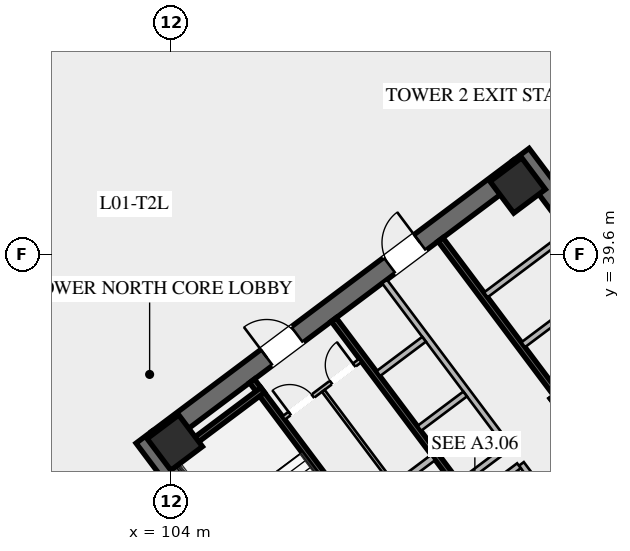
"""IFC4 building model, lengths in metres.
Left out: names, types, materials, properties, quantities, classifications, styles, units other than length and angle.
Written with IfcOpenShell. Run it as: python <this file> out.ifc"""

import sys

from ifc_helpers import new_model, si_unit, direction, frame, frame_2d, origin, origin_2d, place, context, subcontext, project, spatial, rectangle, hollow_rectangle, extrude, element, fill, save


model = new_model("IFC4")
c1 = context("Model", 3, precision=1e-05, world=origin(), true_north=direction((0.0, 1.0)))
c2 = subcontext(c1, "Body", "Model", "MODEL_VIEW")
j1 = project(units=[si_unit("LENGTHUNIT", "METRE"), si_unit("PLANEANGLEUNIT", "RADIAN")], contexts=[c1])
p1 = place(None, origin())
s1 = spatial("IfcSite", under=j1, at=p1, CompositionType="ELEMENT")
p2 = place(p1, origin())
s2 = spatial("IfcBuilding", under=s1, at=p2, CompositionType="ELEMENT")
p3 = place(p2, frame((0.0, 0.0, 5.4)))
s3 = spatial("IfcBuildingStorey", under=s2, at=p3, CompositionType="ELEMENT", Elevation=5.4)
for number, where, z_axis, x_axis in (
    (1, (112.476, 21.107, 0.0), (0.0, 0.0, 1.0), (-0.6, 0.8, 0.0)),
    (2, (115.524, 42.893, 0.0), (0.0, 0.0, 1.0), (0.6, -0.8, 0.0)),
):
    element("IfcWall", number, at=place(p3, frame(where, z_axis=z_axis, x_axis=x_axis)), inside=s3, PredefinedType="SHEAR", context=c2, shape_type="SweptSolid", body=[
        extrude(rectangle(XDim=15.6, YDim=0.65, at=frame_2d((7.8, 0.0))), origin(), (0.0, 0.0, 1.0), 4.8),
    ])
p4 = place(p3, frame((103.571, 33.522, 0.0), z_axis=(0.0, 0.0, 1.0), x_axis=(0.799998028465, 0.600002628705, 0.0)))
e3 = element("IfcWall", 3, at=p4, inside=s3, PredefinedType="SHEAR", context=c2, shape_type="SweptSolid", body=[
    extrude(rectangle(XDim=14.86, YDim=0.65, at=frame_2d((7.43, 0.0))), origin(), (0.0, 0.0, 1.0), 4.8),
])
p5 = place(p4, frame((4.48, 0.0, 0.0)))
e4 = element("IfcOpeningElement", 4, at=p5, cuts=e3, PredefinedType="OPENING", context=c2, shape_type="SweptSolid", body=[
    extrude(rectangle(XDim=1.25, YDim=2.25, at=frame_2d((0.625, 1.125))), frame((0.0, 0.335, 0.0), z_axis=(0.0, -1.0, 0.0), x_axis=(1.0, 0.0, 0.0)), (0.0, 0.0, 1.0), 0.67),
])
p6 = place(p4, frame((9.53, 0.0, 0.0)))
e5 = element("IfcOpeningElement", 5, at=p6, cuts=e3, PredefinedType="OPENING", context=c2, shape_type="SweptSolid", body=[
    extrude(rectangle(XDim=1.25, YDim=2.25, at=frame_2d((0.625, 1.125))), frame((0.0, 0.335, 0.0), z_axis=(0.0, -1.0, 0.0), x_axis=(1.0, 0.0, 0.0)), (0.0, 0.0, 1.0), 0.67),
])
for number, where, z_axis, x_axis in (
    (6, (115.41, 41.87, 0.0), (0.0, 0.0, 1.0), (0.8, 0.6, 0.0)),
    (7, (104.13, 33.41, 0.0), (0.0, 0.0, 1.0), (0.8, 0.6, 0.0)),
):
    element("IfcColumn", number, at=place(p3, frame(where, z_axis=z_axis, x_axis=x_axis)), inside=s3, PredefinedType="COLUMN", context=c2, shape_type="SweptSolid", body=[
        extrude(hollow_rectangle(XDim=1.3, YDim=1.3, WallThickness=0.05, at=origin_2d()), origin(), (0.0, 0.0, 1.0), 4.54),
    ])
p7 = place(p3, frame((111.44, 29.08, 0.0), z_axis=(0.0, 0.0, 1.0), x_axis=(-0.600009827119, 0.799992629566, 0.0)))
e8 = element("IfcWall", 8, at=p7, inside=s3, PredefinedType="SHEAR", context=c2, shape_type="SweptSolid", body=[
    extrude(rectangle(XDim=7.95, YDim=0.2, at=frame_2d((3.975, 0.0))), origin(), (0.0, 0.0, 1.0), 4.54),
])
p8 = place(p7, frame((0.45, 0.0, 0.0)))
e9 = element("IfcOpeningElement", 9, at=p8, cuts=e8, PredefinedType="OPENING", context=c2, shape_type="SweptSolid", body=[
    extrude(rectangle(XDim=1.15, YDim=2.2, at=frame_2d((0.575, 1.1))), frame((0.0, 0.11, 0.0), z_axis=(0.0, -1.0, 0.0), x_axis=(1.0, 0.0, 0.0)), (0.0, 0.0, 1.0), 0.22),
])
p9 = place(p3, frame((104.036, 32.902, 0.0), z_axis=(0.0, 0.0, 1.0), x_axis=(0.800039270442, 0.59994763584, 0.0)))
e10 = element("IfcWall", 10, at=p9, inside=s3, PredefinedType="SHEAR", context=c2, shape_type="SweptSolid", body=[
    extrude(rectangle(XDim=3.73, YDim=0.2, at=frame_2d((1.865, 0.0))), origin(), (0.0, 0.0, 1.0), 4.54),
])
p10 = place(p3, frame((116.56, 34.92, 0.0), z_axis=(0.0, 0.0, 1.0), x_axis=(0.600009827119, -0.799992629566, 0.0)))
e11 = element("IfcWall", 11, at=p10, inside=s3, PredefinedType="SHEAR", context=c2, shape_type="SweptSolid", body=[
    extrude(rectangle(XDim=7.95, YDim=0.2, at=frame_2d((3.975, 0.0))), origin(), (0.0, 0.0, 1.0), 4.54),
])
p11 = place(p10, frame((0.45, 0.0, 0.0)))
e12 = element("IfcOpeningElement", 12, at=p11, cuts=e11, PredefinedType="OPENING", context=c2, shape_type="SweptSolid", body=[
    extrude(rectangle(XDim=1.15, YDim=2.2, at=frame_2d((0.575, 1.1))), frame((0.0, 0.11, 0.0), z_axis=(0.0, -1.0, 0.0), x_axis=(1.0, 0.0, 0.0)), (0.0, 0.0, 1.0), 0.22),
])
p12 = place(p3, frame((116.54, 34.78, 0.0), z_axis=(0.0, 0.0, 1.0), x_axis=(0.799984290658, 0.600020945218, 0.0)))
e13 = element("IfcWall", 13, at=p12, inside=s3, PredefinedType="SHEAR", context=c2, shape_type="SweptSolid", body=[
    extrude(rectangle(XDim=3.73, YDim=0.2, at=frame_2d((1.865, 0.0))), origin(), (0.0, 0.0, 1.0), 4.54),
])
p13 = place(p3, frame((117.938, 26.016, 0.0), z_axis=(0.0, 0.0, 1.0), x_axis=(-0.600005463273, 0.799995902516, 0.0)))
e14 = element("IfcWall", 14, at=p13, inside=s3, PredefinedType="SHEAR", context=c2, shape_type="SweptSolid", body=[
    extrude(rectangle(XDim=14.3, YDim=0.2, at=frame_2d((7.15, 0.0))), origin(), (0.0, 0.0, 1.0), 4.54),
])
p14 = place(p3, frame((110.104, 31.028, 0.0), z_axis=(0.0, 0.0, 1.0), x_axis=(0.800018601094, 0.59997519774, 0.0)))
e15 = element("IfcWall", 15, at=p14, inside=s3, PredefinedType="SOLIDWALL", context=c2, shape_type="SweptSolid", body=[
    extrude(rectangle(XDim=3.15, YDim=0.22, at=frame_2d((1.575, 0.0))), origin(), (0.0, 0.0, 1.0), 3.583),
])
p15 = place(p3, frame((112.87, 40.09, 0.0), z_axis=(0.0, 0.0, 1.0), x_axis=(0.599975393228, -0.800018454488, 0.0)))
e16 = element("IfcWall", 16, at=p15, inside=s3, PredefinedType="SHEAR", context=c2, shape_type="SweptSolid", body=[
    extrude(rectangle(XDim=6.35, YDim=0.2, at=frame_2d((3.175, 0.0))), origin(), (0.0, 0.0, 1.0), 4.54),
])
for number, where, z_axis, x_axis in (
    (17, (115.59, 36.63, 0.0), (0.0, 0.0, 1.0), (0.8, 0.6, 0.0)),
    (18, (114.36, 38.27, 0.0), (0.0, 0.0, 1.0), (0.8, 0.6, 0.0)),
):
    element("IfcWall", number, at=place(p3, frame(where, z_axis=z_axis, x_axis=x_axis)), inside=s3, PredefinedType="SOLIDWALL", context=c2, shape_type="SweptSolid", body=[
        extrude(rectangle(XDim=3.38, YDim=0.2, at=frame_2d((1.69, 0.0))), origin(), (0.0, 0.0, 1.0), 4.54),
    ])
p16 = place(p3, frame((107.71, 34.22, 0.0), z_axis=(0.0, 0.0, 1.0), x_axis=(0.799981399002, 0.60002480053, 0.0)))
e19 = element("IfcWall", 19, at=p16, inside=s3, PredefinedType="PARTITIONING", context=c2, shape_type="SweptSolid", body=[
    extrude(rectangle(XDim=3.15, YDim=0.135, at=frame_2d((1.575, 0.0))), origin(), (0.0, 0.0, 1.0), 3.583),
])
p17 = place(p16, frame((0.25, 0.0, 0.0)))
e20 = element("IfcOpeningElement", 20, at=p17, cuts=e19, PredefinedType="OPENING", context=c2, shape_type="SweptSolid", body=[
    extrude(rectangle(XDim=0.95, YDim=2.05, at=frame_2d((0.475, 1.025))), frame((0.0, 0.077, 0.0), z_axis=(0.0, -1.0, 0.0), x_axis=(1.0, 0.0, 0.0)), (0.0, 0.0, 1.0), 0.155),
])
p18 = place(p16, frame((1.95, 0.0, 0.0)))
e21 = element("IfcOpeningElement", 21, at=p18, cuts=e19, PredefinedType="OPENING", context=c2, shape_type="SweptSolid", body=[
    extrude(rectangle(XDim=0.95, YDim=2.05, at=frame_2d((0.475, 1.025))), frame((0.0, 0.077, 0.0), z_axis=(0.0, -1.0, 0.0), x_axis=(1.0, 0.0, 0.0)), (0.0, 0.0, 1.0), 0.155),
])
p19 = place(p3, frame((111.296, 32.072, 0.0), z_axis=(0.0, 0.0, 1.0), x_axis=(-0.59995887973, 0.800030838552, 0.0)))
e22 = element("IfcWall", 22, at=p19, inside=s3, PredefinedType="PARTITIONING", context=c2, shape_type="SweptSolid", body=[
    extrude(rectangle(XDim=3.8, YDim=0.11, at=frame_2d((1.9, 0.0))), origin(), (0.0, 0.0, 1.0), 3.583),
])
p20 = place(p3, frame((119.61, 27.27, 0.0), z_axis=(0.0, 0.0, 1.0), x_axis=(-0.600011488909, 0.79999138319, 0.0)))
e23 = element("IfcWall", 23, at=p20, inside=s3, PredefinedType="SOLIDWALL", context=c2, shape_type="SweptSolid", body=[
    extrude(rectangle(XDim=6.8, YDim=0.2, at=frame_2d((3.4, 0.0))), origin(), (0.0, 0.0, 1.0), 4.54),
])
p21 = place(p20, frame((0.625, 0.0, 0.0)))
e24 = element("IfcOpeningElement", 24, at=p21, cuts=e23, PredefinedType="OPENING", context=c2, shape_type="SweptSolid", body=[
    extrude(rectangle(XDim=1.1, YDim=2.2, at=frame_2d((0.55, 1.1))), frame((0.0, 0.11, 0.0), z_axis=(0.0, -1.0, 0.0), x_axis=(1.0, 0.0, 0.0)), (0.0, 0.0, 1.0), 0.22),
])
p22 = place(p20, frame((2.875, 0.0, 0.0)))
e25 = element("IfcOpeningElement", 25, at=p22, cuts=e23, PredefinedType="OPENING", context=c2, shape_type="SweptSolid", body=[
    extrude(rectangle(XDim=1.1, YDim=2.2, at=frame_2d((0.55, 1.1))), frame((0.0, 0.11, 0.0), z_axis=(0.0, -1.0, 0.0), x_axis=(1.0, 0.0, 0.0)), (0.0, 0.0, 1.0), 0.22),
])
p23 = place(p20, frame((5.125, 0.0, 0.0)))
e26 = element("IfcOpeningElement", 26, at=p23, cuts=e23, PredefinedType="OPENING", context=c2, shape_type="SweptSolid", body=[
    extrude(rectangle(XDim=1.1, YDim=2.2, at=frame_2d((0.55, 1.1))), frame((0.0, 0.11, 0.0), z_axis=(0.0, -1.0, 0.0), x_axis=(1.0, 0.0, 0.0)), (0.0, 0.0, 1.0), 0.22),
])
p24 = place(p3, frame((113.946, 31.522, 0.0), z_axis=(0.0, 0.0, 1.0), x_axis=(0.8, 0.6, 0.0)))
e27 = element("IfcWall", 27, at=p24, inside=s3, PredefinedType="SOLIDWALL", context=c2, shape_type="SweptSolid", body=[
    extrude(rectangle(XDim=1.88, YDim=0.2, at=frame_2d((0.94, 0.0))), origin(), (0.0, 0.0, 1.0), 4.54),
])
p25 = place(p3, frame((115.11, 33.27, 0.0), z_axis=(0.0, 0.0, 1.0), x_axis=(-0.600011488909, 0.79999138319, 0.0)))
e28 = element("IfcWall", 28, at=p25, inside=s3, PredefinedType="SOLIDWALL", context=c2, shape_type="SweptSolid", body=[
    extrude(rectangle(XDim=6.8, YDim=0.2, at=frame_2d((3.4, 0.0))), origin(), (0.0, 0.0, 1.0), 4.54),
])
p26 = place(p3, frame((113.526, 32.082, 0.0), z_axis=(0.0, 0.0, 1.0), x_axis=(0.800046745961, 0.599937666993, 0.0)))
e29 = element("IfcWall", 29, at=p26, inside=s3, PredefinedType="SOLIDWALL", context=c2, shape_type="SweptSolid", body=[
    extrude(rectangle(XDim=1.88, YDim=0.2, at=frame_2d((0.94, 0.0))), origin(), (0.0, 0.0, 1.0), 4.54),
])
p27 = place(p3, frame((112.176, 33.882, 0.0), z_axis=(0.0, 0.0, 1.0), x_axis=(0.8, 0.6, 0.0)))
e30 = element("IfcWall", 30, at=p27, inside=s3, PredefinedType="SOLIDWALL", context=c2, shape_type="SweptSolid", body=[
    extrude(rectangle(XDim=1.88, YDim=0.2, at=frame_2d((0.94, 0.0))), origin(), (0.0, 0.0, 1.0), 4.54),
])
p28 = place(p3, frame((110.826, 35.682, 0.0), z_axis=(0.0, 0.0, 1.0), x_axis=(0.799984418148, 0.600020775241, 0.0)))
e31 = element("IfcWall", 31, at=p28, inside=s3, PredefinedType="SOLIDWALL", context=c2, shape_type="SweptSolid", body=[
    extrude(rectangle(XDim=1.88, YDim=0.2, at=frame_2d((0.94, 0.0))), origin(), (0.0, 0.0, 1.0), 4.54),
])
p29 = place(p5, origin())
e32 = element("IfcDoor", 32, at=p29, inside=s3, OperationType="SINGLE_SWING_LEFT", PredefinedType="DOOR", context=c2, shape_type="SweptSolid", body=[
    extrude(rectangle(XDim=1.25, YDim=2.25, at=frame_2d((0.625, 1.125))), frame((0.0, 0.025, 0.0), z_axis=(0.0, -1.0, 0.0), x_axis=(1.0, 0.0, 0.0)), (0.0, 0.0, 1.0), 0.05),
])
fill(e4, e32)
p30 = place(p6, origin())
e33 = element("IfcDoor", 33, at=p30, inside=s3, OperationType="SINGLE_SWING_RIGHT", PredefinedType="DOOR", context=c2, shape_type="SweptSolid", body=[
    extrude(rectangle(XDim=1.25, YDim=2.25, at=frame_2d((0.625, 1.125))), frame((0.0, 0.025, 0.0), z_axis=(0.0, -1.0, 0.0), x_axis=(1.0, 0.0, 0.0)), (0.0, 0.0, 1.0), 0.05),
])
fill(e5, e33)
p31 = place(p17, origin())
e34 = element("IfcDoor", 34, at=p31, inside=s3, OperationType="SINGLE_SWING_LEFT", PredefinedType="DOOR", context=c2, shape_type="SweptSolid", body=[
    extrude(rectangle(XDim=0.95, YDim=2.05, at=frame_2d((0.475, 1.025))), frame((0.0, 0.025, 0.0), z_axis=(0.0, -1.0, 0.0), x_axis=(1.0, 0.0, 0.0)), (0.0, 0.0, 1.0), 0.05),
])
fill(e20, e34)
p32 = place(p18, origin())
e35 = element("IfcDoor", 35, at=p32, inside=s3, OperationType="SINGLE_SWING_RIGHT", PredefinedType="DOOR", context=c2, shape_type="SweptSolid", body=[
    extrude(rectangle(XDim=0.95, YDim=2.05, at=frame_2d((0.475, 1.025))), frame((0.0, 0.025, 0.0), z_axis=(0.0, -1.0, 0.0), x_axis=(1.0, 0.0, 0.0)), (0.0, 0.0, 1.0), 0.05),
])
fill(e21, e35)
save(model, sys.argv[1])
